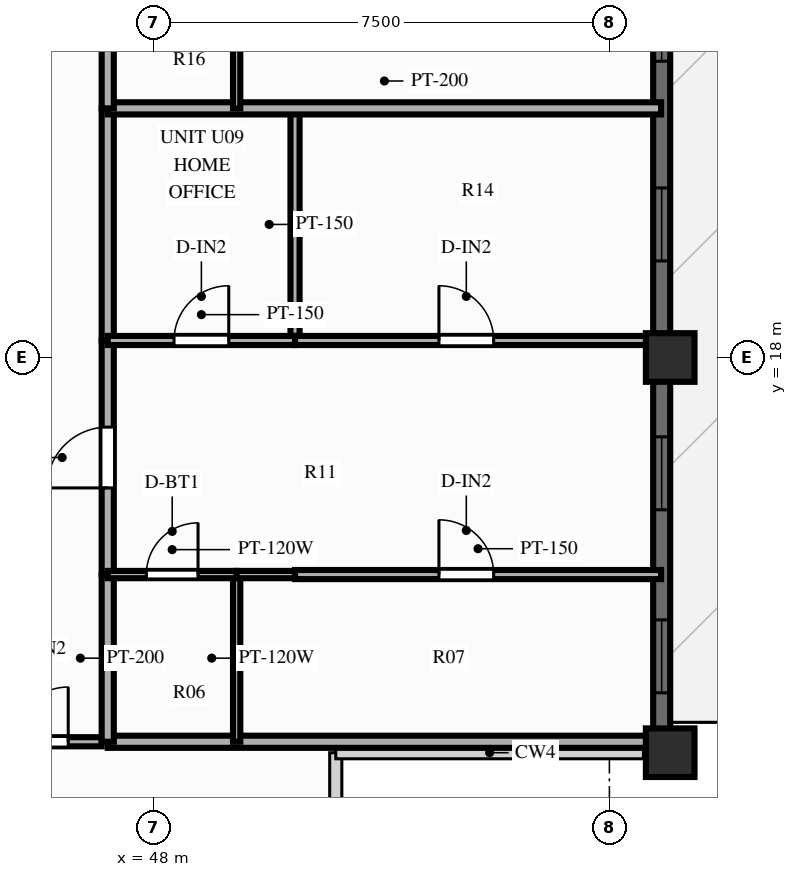
"""IFC4 building model, lengths in metres.
Left out: names, types, materials, properties, quantities, classifications, styles, units other than length and angle.
Written with IfcOpenShell. Run it as: python <this file> out.ifc"""

import sys

from ifc_helpers import new_model, si_unit, direction, frame, frame_2d, origin, origin_2d, place, context, subcontext, project, spatial, rectangle, extrude, source, transform, mapped, element, fill, save


model = new_model("IFC4")
c1 = context("Model", 3, precision=1e-05, world=origin(), true_north=direction((0.0, 1.0)))
c2 = subcontext(c1, "Body", "Model", "MODEL_VIEW")
j1 = project(units=[si_unit("LENGTHUNIT", "METRE"), si_unit("PLANEANGLEUNIT", "RADIAN")], contexts=[c1])
p1 = place(None, origin())
s1 = spatial("IfcSite", under=j1, at=p1, CompositionType="ELEMENT")
p2 = place(p1, origin())
s2 = spatial("IfcBuilding", under=s1, at=p2, CompositionType="ELEMENT")
p3 = place(p2, frame((0.0, 0.0, 196.6)))
s3 = spatial("IfcBuildingStorey", under=s2, at=p3, CompositionType="ELEMENT", Elevation=196.6)
m1 = source(origin(), c2, "Body", "SweptSolid", [
    extrude(rectangle(XDim=0.8, YDim=0.8, at=origin_2d()), origin(), (0.0, 0.0, 1.0), 3.0),
])
for number, where, z_axis, x_axis in (
    (1, (56.5, 11.5, 0.0), (0.0, 0.0, 1.0), (1.0, 0.0, 0.0)),
    (2, (56.5, 18.0, 0.0), (0.0, 0.0, 1.0), (1.0, 0.0, 0.0)),
):
    element("IfcColumn", number, at=place(p3, frame(where, z_axis=z_axis, x_axis=x_axis)), inside=s3, PredefinedType="COLUMN", context=c2, shape_type="MappedRepresentation", body=[
        mapped(m1, transform((0.0, 0.0, 0.0), scale=1.0)),
    ])
p4 = place(p3, frame((56.36, 11.5, 0.0), z_axis=(0.0, 0.0, 1.0), x_axis=(0.0, 1.0, 0.0)))
e3 = element("IfcWall", 3, at=p4, inside=s3, PredefinedType="SOLIDWALL", context=c2, shape_type="SweptSolid", body=[
    extrude(rectangle(XDim=31.0, YDim=0.28, at=frame_2d((15.5, 0.0))), origin(), (0.0, 0.0, 1.0), 2.28),
])
p5 = place(p4, frame((0.985, 0.0, 0.25)))
e4 = element("IfcOpeningElement", 4, at=p5, cuts=e3, PredefinedType="OPENING", context=c2, shape_type="SweptSolid", body=[
    extrude(rectangle(XDim=1.2, YDim=1.5, at=frame_2d((0.6, 0.75))), frame((0.0, 0.152, 0.0), z_axis=(0.0, -1.0, 0.0), x_axis=(1.0, 0.0, 0.0)), (0.0, 0.0, 1.0), 0.304),
])
p6 = place(p4, frame((3.995, 0.0, 0.25)))
e5 = element("IfcOpeningElement", 5, at=p6, cuts=e3, PredefinedType="OPENING", context=c2, shape_type="SweptSolid", body=[
    extrude(rectangle(XDim=1.2, YDim=1.5, at=frame_2d((0.6, 0.75))), frame((0.0, 0.152, 0.0), z_axis=(0.0, -1.0, 0.0), x_axis=(1.0, 0.0, 0.0)), (0.0, 0.0, 1.0), 0.304),
])
p7 = place(p4, frame((8.089, 0.0, 0.25)))
e6 = element("IfcOpeningElement", 6, at=p7, cuts=e3, PredefinedType="OPENING", context=c2, shape_type="SweptSolid", body=[
    extrude(rectangle(XDim=1.2, YDim=1.5, at=frame_2d((0.6, 0.75))), frame((0.0, 0.152, 0.0), z_axis=(0.0, -1.0, 0.0), x_axis=(1.0, 0.0, 0.0)), (0.0, 0.0, 1.0), 0.304),
])
p8 = place(p4, frame((11.373, 0.0, 0.25)))
e7 = element("IfcOpeningElement", 7, at=p8, cuts=e3, PredefinedType="OPENING", context=c2, shape_type="SweptSolid", body=[
    extrude(rectangle(XDim=1.2, YDim=1.5, at=frame_2d((0.6, 0.75))), frame((0.0, 0.152, 0.0), z_axis=(0.0, -1.0, 0.0), x_axis=(1.0, 0.0, 0.0)), (0.0, 0.0, 1.0), 0.304),
])
p9 = place(p4, frame((15.907, 0.0, 0.0), z_axis=(0.0, 0.0, 1.0), x_axis=(-1.0, 0.0, 0.0)))
e8 = element("IfcOpeningElement", 8, at=p9, cuts=e3, PredefinedType="OPENING", context=c2, shape_type="SweptSolid", body=[
    extrude(rectangle(XDim=1.6, YDim=2.15, at=frame_2d((0.8, 1.075))), frame((0.0, 0.152, 0.0), z_axis=(0.0, -1.0, 0.0), x_axis=(1.0, 0.0, 0.0)), (0.0, 0.0, 1.0), 0.304),
])
p10 = place(p4, frame((18.188, 0.0, 0.25)))
e9 = element("IfcOpeningElement", 9, at=p10, cuts=e3, PredefinedType="OPENING", context=c2, shape_type="SweptSolid", body=[
    extrude(rectangle(XDim=1.2, YDim=1.5, at=frame_2d((0.6, 0.75))), frame((0.0, 0.152, 0.0), z_axis=(0.0, -1.0, 0.0), x_axis=(1.0, 0.0, 0.0)), (0.0, 0.0, 1.0), 0.304),
])
p11 = place(p4, frame((21.484, 0.0, 0.25)))
e10 = element("IfcOpeningElement", 10, at=p11, cuts=e3, PredefinedType="OPENING", context=c2, shape_type="SweptSolid", body=[
    extrude(rectangle(XDim=1.2, YDim=1.5, at=frame_2d((0.6, 0.75))), frame((0.0, 0.152, 0.0), z_axis=(0.0, -1.0, 0.0), x_axis=(1.0, 0.0, 0.0)), (0.0, 0.0, 1.0), 0.304),
])
p12 = place(p4, frame((25.259, 0.0, 0.25)))
e11 = element("IfcOpeningElement", 11, at=p12, cuts=e3, PredefinedType="OPENING", context=c2, shape_type="SweptSolid", body=[
    extrude(rectangle(XDim=1.2, YDim=1.5, at=frame_2d((0.6, 0.75))), frame((0.0, 0.152, 0.0), z_axis=(0.0, -1.0, 0.0), x_axis=(1.0, 0.0, 0.0)), (0.0, 0.0, 1.0), 0.304),
])
p13 = place(p4, frame((28.269, 0.0, 0.25)))
e12 = element("IfcOpeningElement", 12, at=p13, cuts=e3, PredefinedType="OPENING", context=c2, shape_type="SweptSolid", body=[
    extrude(rectangle(XDim=1.2, YDim=1.5, at=frame_2d((0.6, 0.75))), frame((0.0, 0.152, 0.0), z_axis=(0.0, -1.0, 0.0), x_axis=(1.0, 0.0, 0.0)), (0.0, 0.0, 1.0), 0.304),
])
p14 = place(p3, frame((44.82, 11.68, 0.0), z_axis=(0.0, 0.0, 1.0), x_axis=(1.0, 0.0, 0.0)))
e13 = element("IfcWall", 13, at=p14, inside=s3, PredefinedType="PARTITIONING", context=c2, shape_type="SweptSolid", body=[
    extrude(rectangle(XDim=2.33, YDim=0.15, at=frame_2d((1.165, 0.0))), origin(), (0.0, 0.0, 1.0), 2.79),
])
p15 = place(p14, frame((0.88, 0.0, 0.0)))
e14 = element("IfcOpeningElement", 14, at=p15, cuts=e13, PredefinedType="OPENING", context=c2, shape_type="SweptSolid", body=[
    extrude(rectangle(XDim=0.9, YDim=2.1, at=frame_2d((0.45, 1.05))), frame((0.0, 0.087, 0.0), z_axis=(0.0, -1.0, 0.0), x_axis=(1.0, 0.0, 0.0)), (0.0, 0.0, 1.0), 0.174),
])
p16 = place(p3, frame((47.25, 11.68, 0.0), z_axis=(0.0, 0.0, 1.0), x_axis=(1.0, 0.0, 0.0)))
e15 = element("IfcWall", 15, at=p16, inside=s3, PredefinedType="PARTITIONING", context=c2, shape_type="SweptSolid", body=[
    extrude(rectangle(XDim=9.1, YDim=0.2, at=frame_2d((4.55, 0.0))), origin(), (0.0, 0.0, 1.0), 2.79),
])
p17 = place(p3, frame((47.25, 11.68, 0.0), z_axis=(0.0, 0.0, 1.0), x_axis=(0.0, 1.0, 0.0)))
e16 = element("IfcWall", 16, at=p17, inside=s3, PredefinedType="PARTITIONING", context=c2, shape_type="SweptSolid", body=[
    extrude(rectangle(XDim=2.75, YDim=0.2, at=frame_2d((1.375, 0.0))), origin(), (0.0, 0.0, 1.0), 2.79),
])
p18 = place(p3, frame((47.25, 14.43, 0.0), z_axis=(0.0, 0.0, 1.0), x_axis=(0.0, 1.0, 0.0)))
e17 = element("IfcWall", 17, at=p18, inside=s3, PredefinedType="PARTITIONING", context=c2, shape_type="SweptSolid", body=[
    extrude(rectangle(XDim=3.85, YDim=0.2, at=frame_2d((1.925, 0.0))), origin(), (0.0, 0.0, 1.0), 2.79),
])
p19 = place(p18, frame((1.425, 0.0, 0.0)))
e18 = element("IfcOpeningElement", 18, at=p19, cuts=e17, PredefinedType="OPENING", context=c2, shape_type="SweptSolid", body=[
    extrude(rectangle(XDim=1.0, YDim=2.15, at=frame_2d((0.5, 1.075))), frame((0.0, 0.112, 0.0), z_axis=(0.0, -1.0, 0.0), x_axis=(1.0, 0.0, 0.0)), (0.0, 0.0, 1.0), 0.224),
])
p20 = place(p3, frame((47.25, 18.28, 0.0), z_axis=(0.0, 0.0, 1.0), x_axis=(0.0, 1.0, 0.0)))
e19 = element("IfcWall", 19, at=p20, inside=s3, PredefinedType="PARTITIONING", context=c2, shape_type="SweptSolid", body=[
    extrude(rectangle(XDim=3.818, YDim=0.2, at=frame_2d((1.909, 0.0))), origin(), (0.0, 0.0, 1.0), 2.79),
])
p21 = place(p3, frame((49.37, 11.68, 0.0), z_axis=(0.0, 0.0, 1.0), x_axis=(0.0, 1.0, 0.0)))
e20 = element("IfcWall", 20, at=p21, inside=s3, PredefinedType="PARTITIONING", context=c2, shape_type="SweptSolid", body=[
    extrude(rectangle(XDim=2.75, YDim=0.12, at=frame_2d((1.375, 0.0))), origin(), (0.0, 0.0, 1.0), 2.79),
])
p22 = place(p3, frame((50.33, 18.28, 0.0), z_axis=(0.0, 0.0, 1.0), x_axis=(0.0, 1.0, 0.0)))
e21 = element("IfcWall", 21, at=p22, inside=s3, PredefinedType="PARTITIONING", context=c2, shape_type="SweptSolid", body=[
    extrude(rectangle(XDim=3.818, YDim=0.15, at=frame_2d((1.909, 0.0))), origin(), (0.0, 0.0, 1.0), 2.49),
])
p23 = place(p3, frame((47.25, 14.43, 0.0), z_axis=(0.0, 0.0, 1.0), x_axis=(1.0, 0.0, 0.0)))
e22 = element("IfcWall", 22, at=p23, inside=s3, PredefinedType="PARTITIONING", context=c2, shape_type="SweptSolid", body=[
    extrude(rectangle(XDim=2.12, YDim=0.12, at=frame_2d((1.06, 0.0))), origin(), (0.0, 0.0, 1.0), 2.79),
])
p24 = place(p23, frame((0.635, 0.0, 0.0)))
e23 = element("IfcOpeningElement", 23, at=p24, cuts=e22, PredefinedType="OPENING", context=c2, shape_type="SweptSolid", body=[
    extrude(rectangle(XDim=0.85, YDim=2.05, at=frame_2d((0.425, 1.025))), frame((0.0, 0.072, 0.0), z_axis=(0.0, -1.0, 0.0), x_axis=(1.0, 0.0, 0.0)), (0.0, 0.0, 1.0), 0.144),
])
p25 = place(p3, frame((49.37, 14.43, 0.0), z_axis=(0.0, 0.0, 1.0), x_axis=(1.0, 0.0, 0.0)))
e24 = element("IfcWall", 24, at=p25, inside=s3, PredefinedType="PARTITIONING", context=c2, shape_type="SweptSolid", body=[
    extrude(rectangle(XDim=0.96, YDim=0.12, at=frame_2d((0.48, 0.0))), origin(), (0.0, 0.0, 1.0), 2.79),
])
p26 = place(p3, frame((50.33, 14.43, 0.0), z_axis=(0.0, 0.0, 1.0), x_axis=(1.0, 0.0, 0.0)))
e25 = element("IfcWall", 25, at=p26, inside=s3, PredefinedType="PARTITIONING", context=c2, shape_type="SweptSolid", body=[
    extrude(rectangle(XDim=6.02, YDim=0.15, at=frame_2d((3.01, 0.0))), origin(), (0.0, 0.0, 1.0), 2.79),
])
p27 = place(p26, frame((2.367, 0.0, 0.0)))
e26 = element("IfcOpeningElement", 26, at=p27, cuts=e25, PredefinedType="OPENING", context=c2, shape_type="SweptSolid", body=[
    extrude(rectangle(XDim=0.9, YDim=2.1, at=frame_2d((0.45, 1.05))), frame((0.0, 0.087, 0.0), z_axis=(0.0, -1.0, 0.0), x_axis=(1.0, 0.0, 0.0)), (0.0, 0.0, 1.0), 0.174),
])
p28 = place(p3, frame((47.25, 18.28, 0.0), z_axis=(0.0, 0.0, 1.0), x_axis=(1.0, 0.0, 0.0)))
e27 = element("IfcWall", 27, at=p28, inside=s3, PredefinedType="PARTITIONING", context=c2, shape_type="SweptSolid", body=[
    extrude(rectangle(XDim=3.08, YDim=0.15, at=frame_2d((1.54, 0.0))), origin(), (0.0, 0.0, 1.0), 2.79),
])
p29 = place(p28, frame((1.09, 0.0, 0.0)))
e28 = element("IfcOpeningElement", 28, at=p29, cuts=e27, PredefinedType="OPENING", context=c2, shape_type="SweptSolid", body=[
    extrude(rectangle(XDim=0.9, YDim=2.1, at=frame_2d((0.45, 1.05))), frame((0.0, 0.087, 0.0), z_axis=(0.0, -1.0, 0.0), x_axis=(1.0, 0.0, 0.0)), (0.0, 0.0, 1.0), 0.174),
])
p30 = place(p3, frame((50.33, 18.28, 0.0), z_axis=(0.0, 0.0, 1.0), x_axis=(1.0, 0.0, 0.0)))
e29 = element("IfcWall", 29, at=p30, inside=s3, PredefinedType="PARTITIONING", context=c2, shape_type="SweptSolid", body=[
    extrude(rectangle(XDim=6.02, YDim=0.15, at=frame_2d((3.01, 0.0))), origin(), (0.0, 0.0, 1.0), 2.79),
])
p31 = place(p30, frame((2.367, 0.0, 0.0)))
e30 = element("IfcOpeningElement", 30, at=p31, cuts=e29, PredefinedType="OPENING", context=c2, shape_type="SweptSolid", body=[
    extrude(rectangle(XDim=0.9, YDim=2.1, at=frame_2d((0.45, 1.05))), frame((0.0, 0.087, 0.0), z_axis=(0.0, -1.0, 0.0), x_axis=(1.0, 0.0, 0.0)), (0.0, 0.0, 1.0), 0.174),
])
p32 = place(p3, frame((47.25, 22.098, 0.0), z_axis=(0.0, 0.0, 1.0), x_axis=(1.0, 0.0, 0.0)))
e31 = element("IfcWall", 31, at=p32, inside=s3, PredefinedType="PARTITIONING", context=c2, shape_type="SweptSolid", body=[
    extrude(rectangle(XDim=9.1, YDim=0.2, at=frame_2d((4.55, 0.0))), origin(), (0.0, 0.0, 1.0), 2.39),
])
p33 = place(p3, frame((47.25, 22.098, 0.0), z_axis=(0.0, 0.0, 1.0), x_axis=(0.0, 1.0, 0.0)))
e32 = element("IfcWall", 32, at=p33, inside=s3, PredefinedType="PARTITIONING", context=c2, shape_type="SweptSolid", body=[
    extrude(rectangle(XDim=2.75, YDim=0.2, at=frame_2d((1.375, 0.0))), origin(), (0.0, 0.0, 1.0), 2.79),
])
p34 = place(p3, frame((49.37, 22.098, 0.0), z_axis=(0.0, 0.0, 1.0), x_axis=(0.0, 1.0, 0.0)))
e33 = element("IfcWall", 33, at=p34, inside=s3, PredefinedType="PARTITIONING", context=c2, shape_type="SweptSolid", body=[
    extrude(rectangle(XDim=2.75, YDim=0.12, at=frame_2d((1.375, 0.0))), origin(), (0.0, 0.0, 1.0), 2.79),
])
m2 = source(origin(), c2, "Body", "SweptSolid", [
    extrude(rectangle(XDim=1.2, YDim=1.5, at=frame_2d((0.6, 0.75))), frame((0.0, 0.03, 0.0), z_axis=(0.0, -1.0, 0.0), x_axis=(1.0, 0.0, 0.0)), (0.0, 0.0, 1.0), 0.06),
])
p35 = place(p5, origin())
e34 = element("IfcWindow", 34, at=p35, inside=s3, PartitioningType="SINGLE_PANEL", PredefinedType="WINDOW", context=c2, shape_type="MappedRepresentation", body=[
    mapped(m2, transform((0.0, 0.0, 0.0), scale=1.0)),
])
fill(e4, e34)
p36 = place(p6, origin())
e35 = element("IfcWindow", 35, at=p36, inside=s3, PartitioningType="SINGLE_PANEL", PredefinedType="WINDOW", context=c2, shape_type="MappedRepresentation", body=[
    mapped(m2, transform((0.0, 0.0, 0.0), scale=1.0)),
])
fill(e5, e35)
p37 = place(p7, origin())
e36 = element("IfcWindow", 36, at=p37, inside=s3, PartitioningType="SINGLE_PANEL", PredefinedType="WINDOW", context=c2, shape_type="MappedRepresentation", body=[
    mapped(m2, transform((0.0, 0.0, 0.0), scale=1.0)),
])
fill(e6, e36)
p38 = place(p8, origin())
e37 = element("IfcWindow", 37, at=p38, inside=s3, PartitioningType="SINGLE_PANEL", PredefinedType="WINDOW", context=c2, shape_type="MappedRepresentation", body=[
    mapped(m2, transform((0.0, 0.0, 0.0), scale=1.0)),
])
fill(e7, e37)
m3 = source(origin(), c2, "Body", "SweptSolid", [
    extrude(rectangle(XDim=0.9, YDim=2.1, at=frame_2d((0.45, 1.05))), frame((0.0, 0.025, 0.0), z_axis=(0.0, -1.0, 0.0), x_axis=(1.0, 0.0, 0.0)), (0.0, 0.0, 1.0), 0.05),
])
p39 = place(p15, origin())
e38 = element("IfcDoor", 38, at=p39, inside=s3, OperationType="SINGLE_SWING_RIGHT", PredefinedType="DOOR", context=c2, shape_type="MappedRepresentation", body=[
    mapped(m3, transform((0.0, 0.0, 0.0), scale=1.0)),
])
fill(e14, e38)
m4 = source(origin(), c2, "Body", "SweptSolid", [
    extrude(rectangle(XDim=1.0, YDim=2.15, at=frame_2d((0.5, 1.075))), frame((0.0, 0.025, 0.0), z_axis=(0.0, -1.0, 0.0), x_axis=(1.0, 0.0, 0.0)), (0.0, 0.0, 1.0), 0.05),
])
p40 = place(p19, origin())
e39 = element("IfcDoor", 39, at=p40, inside=s3, OperationType="SINGLE_SWING_LEFT", PredefinedType="DOOR", context=c2, shape_type="MappedRepresentation", body=[
    mapped(m4, transform((0.0, 0.0, 0.0), scale=1.0)),
])
fill(e18, e39)
m5 = source(origin(), c2, "Body", "SweptSolid", [
    extrude(rectangle(XDim=0.85, YDim=2.05, at=frame_2d((0.425, 1.025))), frame((0.0, 0.025, 0.0), z_axis=(0.0, -1.0, 0.0), x_axis=(1.0, 0.0, 0.0)), (0.0, 0.0, 1.0), 0.05),
])
p41 = place(p24, origin())
e40 = element("IfcDoor", 40, at=p41, inside=s3, OperationType="SINGLE_SWING_RIGHT", PredefinedType="DOOR", context=c2, shape_type="MappedRepresentation", body=[
    mapped(m5, transform((0.0, 0.0, 0.0), scale=1.0)),
])
fill(e23, e40)
p42 = place(p27, origin())
e41 = element("IfcDoor", 41, at=p42, inside=s3, OperationType="SINGLE_SWING_LEFT", PredefinedType="DOOR", context=c2, shape_type="MappedRepresentation", body=[
    mapped(m3, transform((0.0, 0.0, 0.0), scale=1.0)),
])
fill(e26, e41)
p43 = place(p29, origin())
e42 = element("IfcDoor", 42, at=p43, inside=s3, OperationType="SINGLE_SWING_RIGHT", PredefinedType="DOOR", context=c2, shape_type="MappedRepresentation", body=[
    mapped(m3, transform((0.0, 0.0, 0.0), scale=1.0)),
])
fill(e28, e42)
p44 = place(p31, origin())
e43 = element("IfcDoor", 43, at=p44, inside=s3, OperationType="SINGLE_SWING_LEFT", PredefinedType="DOOR", context=c2, shape_type="MappedRepresentation", body=[
    mapped(m3, transform((0.0, 0.0, 0.0), scale=1.0)),
])
fill(e30, e43)
save(model, sys.argv[1])
